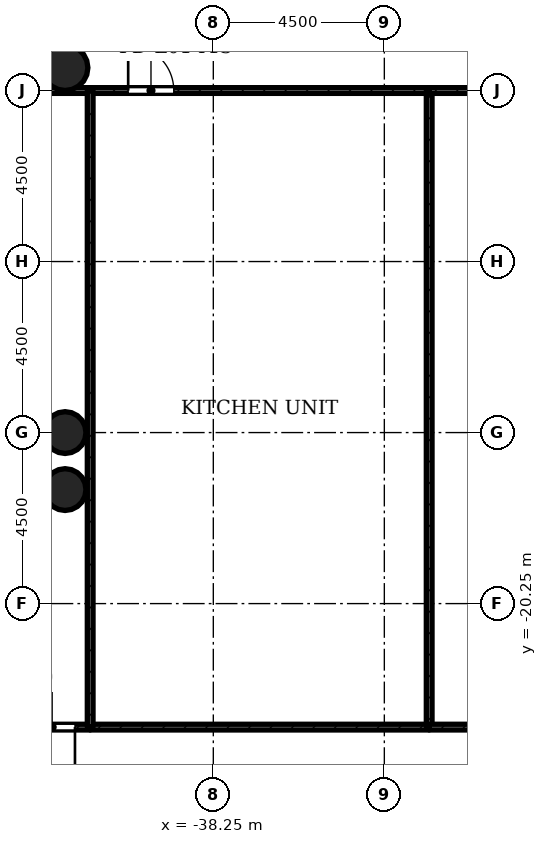
"""IFC4 building model, lengths in metres.
Left out: names, types, materials, properties, quantities, classifications, styles, units other than length and angle.
Written with IfcOpenShell. Run it as: python <this file> out.ifc"""

import sys

from ifc_helpers import new_model, si_unit, direction, frame, frame_2d, origin, origin_2d, place, context, subcontext, project, spatial, rectangle, hollow_circle, extrude, element, fill, save


model = new_model("IFC4")
c1 = context("Model", 3, precision=1e-05, world=origin(), true_north=direction((0.0, 1.0)))
c2 = subcontext(c1, "Body", "Model", "MODEL_VIEW")
j1 = project(units=[si_unit("LENGTHUNIT", "METRE"), si_unit("PLANEANGLEUNIT", "RADIAN")], contexts=[c1])
p1 = place(None, origin())
s1 = spatial("IfcSite", under=j1, at=p1, CompositionType="ELEMENT")
p2 = place(p1, origin())
s2 = spatial("IfcBuilding", under=s1, at=p2, CompositionType="ELEMENT")
p3 = place(p2, frame((0.0, 0.0, 6.0)))
s3 = spatial("IfcBuildingStorey", under=s2, at=p3, CompositionType="ELEMENT", Elevation=6.0)
for number, where, z_axis, x_axis in (
    (1, (-42.15, -15.75, 0.0), (0.0, 0.0, 1.0), (1.0, 0.0, 0.0)),
    (2, (-42.15, -17.25, 0.0), (0.0, 0.0, 1.0), (1.0, 0.0, 0.0)),
):
    element("IfcColumn", number, at=place(p3, frame(where, z_axis=z_axis, x_axis=x_axis)), inside=s3, PredefinedType="COLUMN", context=c2, shape_type="SweptSolid", body=[
        extrude(hollow_circle(Radius=0.55, WallThickness=0.04, at=origin_2d()), origin(), (0.0, 0.0, 1.0), 5.0),
    ])
p4 = place(p3, frame((-42.15, -6.15, 0.0), z_axis=(0.0, 0.0, 1.0), x_axis=(1.0, 0.0, 0.0)))
e3 = element("IfcColumn", 3, at=p4, inside=s3, PredefinedType="COLUMN", context=c2, shape_type="SweptSolid", body=[
    extrude(hollow_circle(Radius=0.6, WallThickness=0.045, at=origin_2d()), origin(), (0.0, 0.0, 1.0), 5.0),
])
p5 = place(p3, frame((-42.75, -6.75, 0.0), z_axis=(0.0, 0.0, 1.0), x_axis=(1.0, 0.0, 0.0)))
e4 = element("IfcWall", 4, at=p5, inside=s3, PredefinedType="PARTITIONING", context=c2, shape_type="SweptSolid", body=[
    extrude(rectangle(XDim=1.26, YDim=0.15, at=frame_2d((0.63, 0.0))), origin(), (0.0, 0.0, 1.0), 4.58),
])
p6 = place(p3, frame((-41.49, -23.5, 0.0), z_axis=(0.0, 0.0, 1.0), x_axis=(-1.0, 0.0, 0.0)))
e5 = element("IfcWall", 5, at=p6, inside=s3, PredefinedType="PARTITIONING", context=c2, shape_type="SweptSolid", body=[
    extrude(rectangle(XDim=8.92, YDim=0.15, at=frame_2d((4.46, 0.0))), origin(), (0.0, 0.0, 1.0), 4.58),
])
p7 = place(p6, frame((0.4, 0.0, 0.0)))
e6 = element("IfcOpeningElement", 6, at=p7, cuts=e5, PredefinedType="OPENING", context=c2, shape_type="SweptSolid", body=[
    extrude(rectangle(XDim=1.2, YDim=2.1, at=frame_2d((0.6, 1.05))), frame((0.0, 0.085, 0.0), z_axis=(0.0, -1.0, 0.0), x_axis=(1.0, 0.0, 0.0)), (0.0, 0.0, 1.0), 0.17),
])
p8 = place(p3, frame((-41.49, -6.75, 0.0), z_axis=(0.0, 0.0, 1.0), x_axis=(1.0, 0.0, 0.0)))
e7 = element("IfcWall", 7, at=p8, inside=s3, PredefinedType="PARTITIONING", context=c2, shape_type="SweptSolid", body=[
    extrude(rectangle(XDim=8.92, YDim=0.15, at=frame_2d((4.46, 0.0))), origin(), (0.0, 0.0, 1.0), 4.58),
])
p9 = place(p8, frame((1.0, 0.0, 0.0)))
e8 = element("IfcOpeningElement", 8, at=p9, cuts=e7, PredefinedType="OPENING", context=c2, shape_type="SweptSolid", body=[
    extrude(rectangle(XDim=1.2, YDim=2.1, at=frame_2d((0.6, 1.05))), frame((0.0, 0.085, 0.0), z_axis=(0.0, -1.0, 0.0), x_axis=(1.0, 0.0, 0.0)), (0.0, 0.0, 1.0), 0.17),
])
p10 = place(p3, frame((-32.57, -23.5, 0.0), z_axis=(0.0, 0.0, 1.0), x_axis=(-1.0, 0.0, 0.0)))
e9 = element("IfcWall", 9, at=p10, inside=s3, PredefinedType="PARTITIONING", context=c2, shape_type="SweptSolid", body=[
    extrude(rectangle(XDim=8.92, YDim=0.15, at=frame_2d((4.46, 0.0))), origin(), (0.0, 0.0, 1.0), 4.58),
])
for number, where, z_axis, x_axis in (
    (10, (-41.49, -23.5, 0.0), (0.0, 0.0, 1.0), (0.0, 1.0, 0.0)),
    (11, (-32.57, -6.75, 0.0), (0.0, 0.0, 1.0), (0.0, -1.0, 0.0)),
):
    element("IfcWall", number, at=place(p3, frame(where, z_axis=z_axis, x_axis=x_axis)), inside=s3, PredefinedType="PARTITIONING", context=c2, shape_type="SweptSolid", body=[
        extrude(rectangle(XDim=16.75, YDim=0.15, at=frame_2d((8.375, 0.0))), origin(), (0.0, 0.0, 1.0), 4.58),
    ])
p11 = place(p3, frame((-32.57, -6.75, 0.0), z_axis=(0.0, 0.0, 1.0), x_axis=(1.0, 0.0, 0.0)))
e12 = element("IfcWall", 12, at=p11, inside=s3, PredefinedType="PARTITIONING", context=c2, shape_type="SweptSolid", body=[
    extrude(rectangle(XDim=3.32, YDim=0.15, at=frame_2d((1.66, 0.0))), origin(), (0.0, 0.0, 1.0), 4.58),
])
p12 = place(p3, frame((-23.65, -23.5, 0.0), z_axis=(0.0, 0.0, 1.0), x_axis=(-1.0, 0.0, 0.0)))
e13 = element("IfcWall", 13, at=p12, inside=s3, PredefinedType="PARTITIONING", context=c2, shape_type="SweptSolid", body=[
    extrude(rectangle(XDim=8.92, YDim=0.15, at=frame_2d((4.46, 0.0))), origin(), (0.0, 0.0, 1.0), 4.58),
])
p13 = place(p12, frame((0.4, 0.0, 0.0)))
e14 = element("IfcOpeningElement", 14, at=p13, cuts=e13, PredefinedType="OPENING", context=c2, shape_type="SweptSolid", body=[
    extrude(rectangle(XDim=1.2, YDim=2.1, at=frame_2d((0.6, 1.05))), frame((0.0, 0.085, 0.0), z_axis=(0.0, -1.0, 0.0), x_axis=(1.0, 0.0, 0.0)), (0.0, 0.0, 1.0), 0.17),
])
p14 = place(p7, origin())
e15 = element("IfcDoor", 15, at=p14, inside=s3, OperationType="SINGLE_SWING_RIGHT", PredefinedType="DOOR", context=c2, shape_type="SweptSolid", body=[
    extrude(rectangle(XDim=1.2, YDim=2.1, at=frame_2d((0.6, 1.05))), frame((0.0, 0.025, 0.0), z_axis=(0.0, -1.0, 0.0), x_axis=(1.0, 0.0, 0.0)), (0.0, 0.0, 1.0), 0.05),
])
fill(e6, e15)
p15 = place(p9, origin())
e16 = element("IfcDoor", 16, at=p15, inside=s3, OperationType="SINGLE_SWING_RIGHT", PredefinedType="DOOR", context=c2, shape_type="SweptSolid", body=[
    extrude(rectangle(XDim=1.2, YDim=2.1, at=frame_2d((0.6, 1.05))), frame((0.0, 0.025, 0.0), z_axis=(0.0, -1.0, 0.0), x_axis=(1.0, 0.0, 0.0)), (0.0, 0.0, 1.0), 0.05),
])
fill(e8, e16)
save(model, sys.argv[1])
